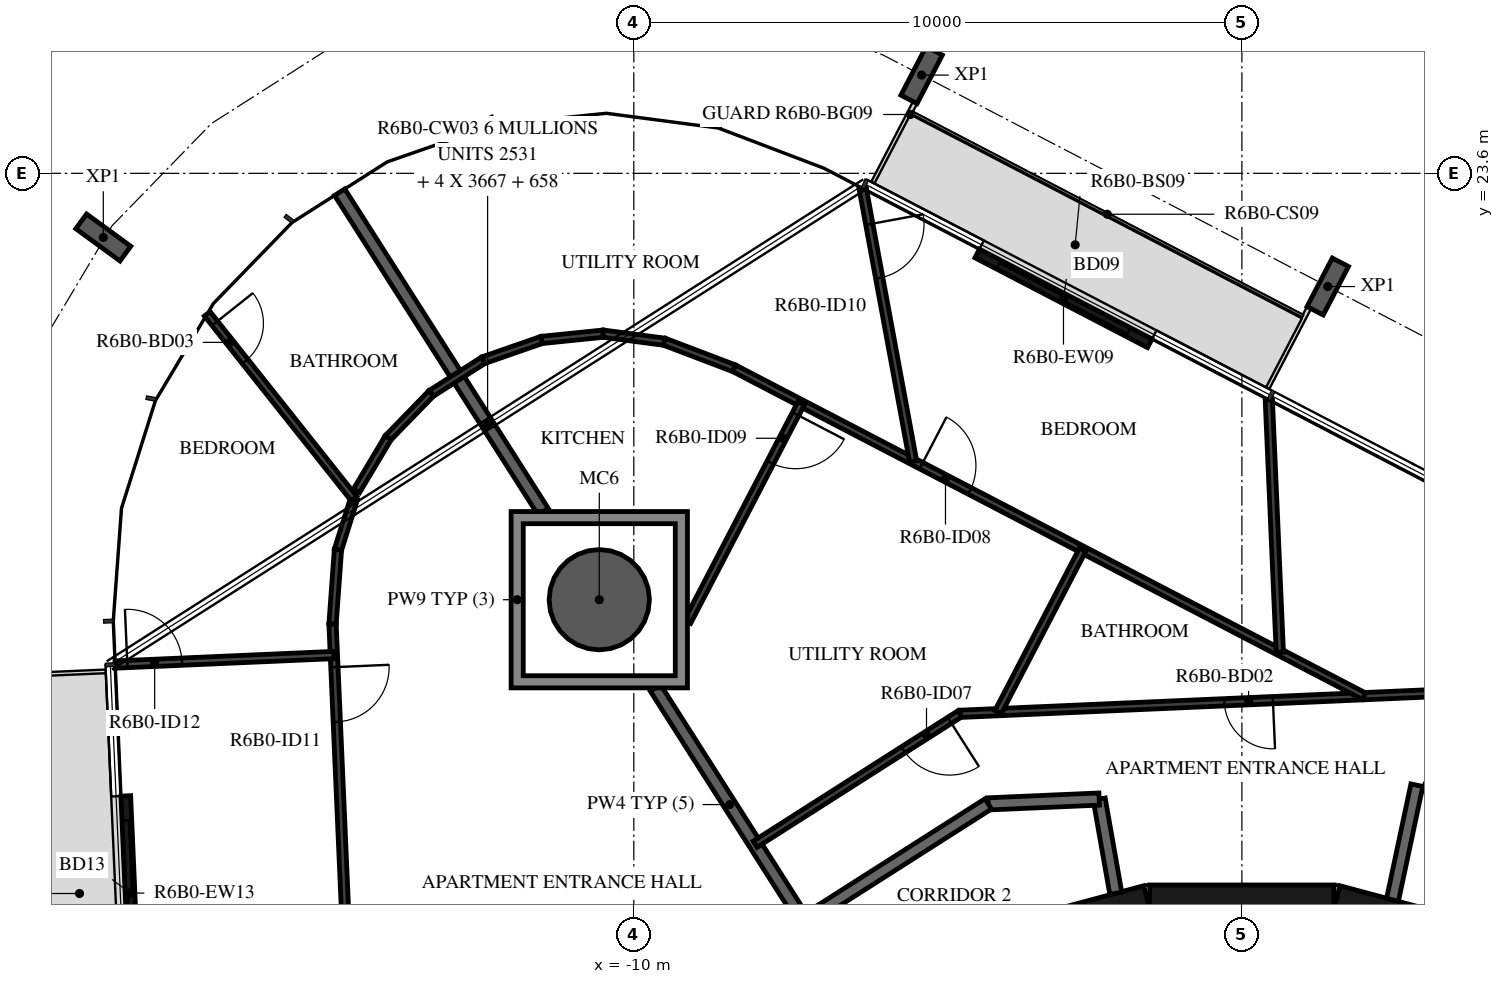
"""IFC4 building model, lengths in metres.
Left out: names, types, materials, properties, quantities, classifications, styles, units other than length and angle.
Written with IfcOpenShell. Run it as: python <this file> out.ifc"""

import sys

from ifc_helpers import new_model, si_unit, direction, frame, frame_2d, origin, origin_2d, place, context, subcontext, project, spatial, polyline, rectangle, hollow_circle, i_section, outline, extrude, element, fill, save


model = new_model("IFC4")
c1 = context("Model", 3, precision=1e-05, world=origin(), true_north=direction((0.0, 1.0)))
c2 = subcontext(c1, "Body", "Model", "MODEL_VIEW")
j1 = project(units=[si_unit("LENGTHUNIT", "METRE"), si_unit("PLANEANGLEUNIT", "RADIAN")], contexts=[c1])
p1 = place(None, origin())
s1 = spatial("IfcSite", under=j1, at=p1, CompositionType="ELEMENT")
p2 = place(p1, origin())
s2 = spatial("IfcBuilding", under=s1, at=p2, CompositionType="ELEMENT")
p3 = place(p2, frame((0.0, 0.0, 240.7)))
s3 = spatial("IfcBuildingStorey", under=s2, at=p3, CompositionType="ELEMENT", Elevation=240.7)
p4 = place(p3, frame((-10.568, 16.588, -0.38), z_axis=(0.0, 0.0, 1.0), x_axis=(1.0, 0.0, 0.0)))
e1 = element("IfcColumn", 1, at=p4, inside=s3, PredefinedType="COLUMN", context=c2, shape_type="SweptSolid", body=[
    extrude(hollow_circle(Radius=0.825, WallThickness=0.04, at=origin_2d()), origin(), (0.0, 0.0, 1.0), 3.5),
])
for number, where, z_axis, x_axis in (
    (2, (1.412, 21.739, -0.38), (0.0, 0.0, 1.0), (0.887, -0.462, 0.0)),
    (3, (-5.267, 25.216, -0.38), (0.0, 0.0, 1.0), (0.887, -0.462, 0.0)),
    (4, (-18.724, 22.545, -0.38), (0.0, 0.0, 1.0), (0.59, 0.808, 0.0)),
):
    element("IfcColumn", number, at=place(p3, frame(where, z_axis=z_axis, x_axis=x_axis)), inside=s3, PredefinedType="COLUMN", context=c2, shape_type="SweptSolid", body=[
        extrude(i_section(OverallWidth=0.3, OverallDepth=0.9, WebThickness=0.019, FlangeThickness=0.035, FilletRadius=0.03, at=origin_2d()), origin(), (0.0, 0.0, 1.0), 3.5),
    ])
p5 = place(p3, frame((-1.515, 20.804, 0.0), z_axis=(0.0, 0.0, 1.0), x_axis=(-0.887014349583, 0.461741858221, 0.0)))
e5 = element("IfcWall", 5, at=p5, inside=s3, PredefinedType="STANDARD", context=c2, shape_type="SweptSolid", body=[
    extrude(rectangle(XDim=3.2, YDim=0.16, at=frame_2d((1.6, 0.0))), origin(), (0.0, 0.0, 1.0), 3.12),
])
p6 = place(p5, frame((0.4, 0.0, 0.0)))
e6 = element("IfcOpeningElement", 6, at=p6, cuts=e5, PredefinedType="OPENING", context=c2, shape_type="SweptSolid", body=[
    extrude(rectangle(XDim=2.4, YDim=2.4, at=frame_2d((1.2, 1.2))), frame((0.0, 0.09, 0.0), z_axis=(0.0, -1.0, 0.0), x_axis=(1.0, 0.0, 0.0)), (0.0, 0.0, 1.0), 0.18),
])
p7 = place(p3, frame((-18.355, 13.362, 0.0), z_axis=(0.0, 0.0, 1.0), x_axis=(0.043639181999, -0.999047357133, 0.0)))
e7 = element("IfcWall", 7, at=p7, inside=s3, PredefinedType="STANDARD", context=c2, shape_type="SweptSolid", body=[
    extrude(rectangle(XDim=3.2, YDim=0.16, at=frame_2d((1.6, 0.0))), origin(), (0.0, 0.0, 1.0), 3.12),
])
p8 = place(p7, frame((0.4, 0.0, 0.0)))
e8 = element("IfcOpeningElement", 8, at=p8, cuts=e7, PredefinedType="OPENING", context=c2, shape_type="SweptSolid", body=[
    extrude(rectangle(XDim=2.4, YDim=2.4, at=frame_2d((1.2, 1.2))), frame((0.0, 0.09, 0.0), z_axis=(0.0, -1.0, 0.0), x_axis=(1.0, 0.0, 0.0)), (0.0, 0.0, 1.0), 0.18),
])
for number, where, z_axis, x_axis in (
    (9, (4.479, 10.858, 0.0), (0.0, 0.0, 1.0), (-0.966, 0.259, 0.0)),
    (10, (1.516, 11.647, 0.0), (0.0, 0.0, 1.0), (-1.0, 0.0, 0.0)),
    (11, (-1.55, 11.643, 0.0), (0.0, 0.0, 1.0), (-0.966, -0.259, 0.0)),
):
    element("IfcWall", number, at=place(p3, frame(where, z_axis=z_axis, x_axis=x_axis)), inside=s3, PredefinedType="SHEAR", context=c2, shape_type="SweptSolid", body=[
        extrude(rectangle(XDim=3.033, YDim=0.5, at=frame_2d((1.516, 0.0))), origin(), (0.0, 0.0, 1.0), 3.12),
    ])
p9 = place(p3, frame((9.372, 10.228, 0.0), z_axis=(0.0, 0.0, 1.0), x_axis=(-0.887005184532, 0.461759464021, 0.0)))
e12 = element("IfcWall", 12, at=p9, inside=s3, PredefinedType="STANDARD", context=c2, shape_type="SweptSolid", body=[
    extrude(rectangle(XDim=7.181, YDim=0.2, at=frame_2d((3.591, 0.0))), origin(), (0.0, 0.0, 1.0), 3.12),
])
p10 = place(p3, frame((2.878, 13.538, 0.0), z_axis=(0.0, 0.0, 1.0), x_axis=(-0.207893604596, -0.978151444904, 0.0)))
e13 = element("IfcWall", 13, at=p10, inside=s3, PredefinedType="STANDARD", context=c2, shape_type="SweptSolid", body=[
    extrude(rectangle(XDim=1.927, YDim=0.2, at=frame_2d((0.963, 0.0))), origin(), (0.0, 0.0, 1.0), 3.12),
])
p11 = place(p3, frame((-2.074, 11.761, 0.0), z_axis=(0.0, 0.0, 1.0), x_axis=(-0.173679082312, 0.984802303189, 0.0)))
e14 = element("IfcWall", 14, at=p11, inside=s3, PredefinedType="STANDARD", context=c2, shape_type="SweptSolid", body=[
    extrude(rectangle(XDim=1.573, YDim=0.2, at=frame_2d((0.787, 0.0))), origin(), (0.0, 0.0, 1.0), 3.12),
])
p12 = place(p3, frame((-2.347, 13.31, 0.0), z_axis=(0.0, 0.0, 1.0), x_axis=(-0.999050095671, -0.043576442492, 0.0)))
e15 = element("IfcWall", 15, at=p12, inside=s3, PredefinedType="STANDARD", context=c2, shape_type="SweptSolid", body=[
    extrude(rectangle(XDim=1.826, YDim=0.2, at=frame_2d((0.913, 0.0))), origin(), (0.0, 0.0, 1.0), 3.12),
])
p13 = place(p3, frame((-4.172, 13.231, 0.0), z_axis=(0.0, 0.0, 1.0), x_axis=(-0.843388394728, -0.537304397561, 0.0)))
e16 = element("IfcWall", 16, at=p13, inside=s3, PredefinedType="STANDARD", context=c2, shape_type="SweptSolid", body=[
    extrude(rectangle(XDim=7.181, YDim=0.2, at=frame_2d((3.59, 0.0))), origin(), (0.0, 0.0, 1.0), 3.12),
])
p14 = place(p3, frame((-9.645, 15.138, 0.0), z_axis=(0.0, 0.0, 1.0), x_axis=(0.537267800866, -0.84341170857, 0.0)))
e17 = element("IfcWall", 17, at=p14, inside=s3, PredefinedType="STANDARD", context=c2, shape_type="SweptSolid", body=[
    extrude(rectangle(XDim=4.55, YDim=0.2, at=frame_2d((2.275, 0.0))), origin(), (0.0, 0.0, 1.0), 3.12),
])
p15 = place(p3, frame((-14.837, 23.29, 0.0), z_axis=(0.0, 0.0, 1.0), x_axis=(0.537316863221, -0.843380452998, 0.0)))
e18 = element("IfcWall", 18, at=p15, inside=s3, PredefinedType="STANDARD", context=c2, shape_type="SweptSolid", body=[
    extrude(rectangle(XDim=6.227, YDim=0.2, at=frame_2d((3.113, 0.0))), origin(), (0.0, 0.0, 1.0), 3.12),
])
p16 = place(p3, frame((3.339, 15.06, 0.0), z_axis=(0.0, 0.0, 1.0), x_axis=(-0.999047716945, -0.043630943905, 0.0)))
e19 = element("IfcWall", 19, at=p16, inside=s3, PredefinedType="PARTITIONING", context=c2, shape_type="SweptSolid", body=[
    extrude(rectangle(XDim=7.985, YDim=0.12, at=frame_2d((3.992, 0.0))), origin(), (0.0, 0.0, 1.0), 3.12),
])
p17 = place(p16, frame((2.831, 0.0, 0.0)))
e20 = element("IfcOpeningElement", 20, at=p17, cuts=e19, PredefinedType="OPENING", context=c2, shape_type="SweptSolid", body=[
    extrude(rectangle(XDim=0.8, YDim=2.1, at=frame_2d((0.4, 1.05))), frame((0.0, 0.07, 0.0), z_axis=(0.0, -1.0, 0.0), x_axis=(1.0, 0.0, 0.0)), (0.0, 0.0, 1.0), 0.14),
])
p18 = place(p3, frame((-4.639, 14.712, 0.0), z_axis=(0.0, 0.0, 1.0), x_axis=(-0.843376843237, -0.537322529113, 0.0)))
e21 = element("IfcWall", 21, at=p18, inside=s3, PredefinedType="PARTITIONING", context=c2, shape_type="SweptSolid", body=[
    extrude(rectangle(XDim=3.992, YDim=0.12, at=frame_2d((1.996, 0.0))), origin(), (0.0, 0.0, 1.0), 3.12),
])
p19 = place(p18, frame((0.2, 0.0, 0.0)))
e22 = element("IfcOpeningElement", 22, at=p19, cuts=e21, PredefinedType="OPENING", context=c2, shape_type="SweptSolid", body=[
    extrude(rectangle(XDim=0.9, YDim=2.1, at=frame_2d((0.45, 1.05))), frame((0.0, 0.07, 0.0), z_axis=(0.0, -1.0, 0.0), x_axis=(1.0, 0.0, 0.0)), (0.0, 0.0, 1.0), 0.14),
])
p20 = place(p3, frame((-8.35, 20.394, 0.0), z_axis=(0.0, 0.0, 1.0), x_axis=(0.887020940825, -0.461729196107, 0.0)))
e23 = element("IfcWall", 23, at=p20, inside=s3, PredefinedType="PARTITIONING", context=c2, shape_type="SweptSolid", body=[
    extrude(rectangle(XDim=11.678, YDim=0.12, at=frame_2d((5.839, 0.0))), origin(), (0.0, 0.0, 1.0), 3.12),
])
p21 = place(p20, frame((3.469, 0.0, 0.0)))
e24 = element("IfcOpeningElement", 24, at=p21, cuts=e23, PredefinedType="OPENING", context=c2, shape_type="SweptSolid", body=[
    extrude(rectangle(XDim=0.9, YDim=2.1, at=frame_2d((0.45, 1.05))), frame((0.0, 0.07, 0.0), z_axis=(0.0, -1.0, 0.0), x_axis=(1.0, 0.0, 0.0)), (0.0, 0.0, 1.0), 0.14),
])
p22 = place(p3, frame((0.442, 19.876, 0.0), z_axis=(0.0, 0.0, 1.0), x_axis=(0.043638577658, -0.999047383531, 0.0)))
e25 = element("IfcWall", 25, at=p22, inside=s3, PredefinedType="PARTITIONING", context=c2, shape_type="SweptSolid", body=[
    extrude(rectangle(XDim=4.157, YDim=0.12, at=frame_2d((2.078, 0.0))), origin(), (0.0, 0.0, 1.0), 3.12),
])
p23 = place(p3, frame((-2.619, 17.411, 0.0), z_axis=(0.0, 0.0, 1.0), x_axis=(-0.461743141736, -0.887013681439, 0.0)))
e26 = element("IfcWall", 26, at=p23, inside=s3, PredefinedType="PARTITIONING", context=c2, shape_type="SweptSolid", body=[
    extrude(rectangle(XDim=3.012, YDim=0.12, at=frame_2d((1.506, 0.0))), origin(), (0.0, 0.0, 1.0), 3.12),
])
p24 = place(p3, frame((-6.237, 23.353, 0.0), z_axis=(0.0, 0.0, 1.0), x_axis=(0.181909323114, -0.983315309636, 0.0)))
e27 = element("IfcWall", 27, at=p24, inside=s3, PredefinedType="PARTITIONING", context=c2, shape_type="SweptSolid", body=[
    extrude(rectangle(XDim=4.567, YDim=0.12, at=frame_2d((2.284, 0.0))), origin(), (0.0, 0.0, 1.0), 3.12),
])
p25 = place(p24, frame((0.6, 0.0, 0.0)))
e28 = element("IfcOpeningElement", 28, at=p25, cuts=e27, PredefinedType="OPENING", context=c2, shape_type="SweptSolid", body=[
    extrude(rectangle(XDim=0.9, YDim=2.1, at=frame_2d((0.45, 1.05))), frame((0.0, 0.07, 0.0), z_axis=(0.0, -1.0, 0.0), x_axis=(1.0, 0.0, 0.0)), (0.0, 0.0, 1.0), 0.14),
])
p26 = place(p3, frame((-7.247, 19.82, 0.0), z_axis=(0.0, 0.0, 1.0), x_axis=(-0.461733980956, -0.887018450107, 0.0)))
e29 = element("IfcWall", 29, at=p26, inside=s3, PredefinedType="PARTITIONING", context=c2, shape_type="SweptSolid", body=[
    extrude(rectangle(XDim=4.052, YDim=0.12, at=frame_2d((2.026, 0.0))), origin(), (0.0, 0.0, 1.0), 3.12),
])
p27 = place(p26, frame((0.2, 0.0, 0.0)))
e30 = element("IfcOpeningElement", 30, at=p27, cuts=e29, PredefinedType="OPENING", context=c2, shape_type="SweptSolid", body=[
    extrude(rectangle(XDim=0.9, YDim=2.1, at=frame_2d((0.45, 1.05))), frame((0.0, 0.07, 0.0), z_axis=(0.0, -1.0, 0.0), x_axis=(1.0, 0.0, 0.0)), (0.0, 0.0, 1.0), 0.14),
])
for number, where, z_axis, x_axis in (
    (31, (-13.332, 19.981, 0.0), (0.0, 0.0, 1.0), (0.843, 0.537, 0.0)),
    (32, (-12.475, 20.527, 0.0), (0.0, 0.0, 1.0), (0.945, 0.328, 0.0)),
):
    element("IfcWall", number, at=place(p3, frame(where, z_axis=z_axis, x_axis=x_axis)), inside=s3, PredefinedType="PARTITIONING", context=c2, shape_type="SweptSolid", body=[
        extrude(rectangle(XDim=1.016, YDim=0.12, at=frame_2d((0.508, 0.0))), origin(), (0.0, 0.0, 1.0), 3.12),
    ])
p28 = place(p3, frame((-11.515, 20.86, 0.0), z_axis=(0.0, 0.0, 1.0), x_axis=(0.994818278641, 0.101669034034, 0.0)))
e33 = element("IfcWall", 33, at=p28, inside=s3, PredefinedType="PARTITIONING", context=c2, shape_type="SweptSolid", body=[
    extrude(rectangle(XDim=1.016, YDim=0.12, at=frame_2d((0.508, 0.0))), origin(), (0.0, 0.0, 1.0), 3.12),
])
p29 = place(p3, frame((-10.504, 20.963, 0.0), z_axis=(0.0, 0.0, 1.0), x_axis=(0.991451023706, -0.13047937612, 0.0)))
e34 = element("IfcWall", 34, at=p29, inside=s3, PredefinedType="PARTITIONING", context=c2, shape_type="SweptSolid", body=[
    extrude(rectangle(XDim=1.016, YDim=0.12, at=frame_2d((0.508, 0.0))), origin(), (0.0, 0.0, 1.0), 3.12),
])
p30 = place(p3, frame((-9.497, 20.831, 0.0), z_axis=(0.0, 0.0, 1.0), x_axis=(0.934575963521, -0.355763641213, 0.0)))
e35 = element("IfcWall", 35, at=p30, inside=s3, PredefinedType="PARTITIONING", context=c2, shape_type="SweptSolid", body=[
    extrude(rectangle(XDim=1.227, YDim=0.12, at=frame_2d((0.614, 0.0))), origin(), (0.0, 0.0, 1.0), 3.12),
])
for number, where, z_axis, x_axis in (
    (36, (-13.332, 19.981, 0.0), (0.0, 0.0, 1.0), (-0.697, -0.717, 0.0)),
    (37, (-14.039, 19.252, 0.0), (0.0, 0.0, 1.0), (-0.513, -0.859, 0.0)),
):
    element("IfcWall", number, at=place(p3, frame(where, z_axis=z_axis, x_axis=x_axis)), inside=s3, PredefinedType="PARTITIONING", context=c2, shape_type="SweptSolid", body=[
        extrude(rectangle(XDim=1.016, YDim=0.12, at=frame_2d((0.508, 0.0))), origin(), (0.0, 0.0, 1.0), 3.12),
    ])
p31 = place(p3, frame((-14.601, 18.25, 0.0), z_axis=(0.0, 0.0, 1.0), x_axis=(-0.300706496876, -0.953716730867, 0.0)))
e38 = element("IfcWall", 38, at=p31, inside=s3, PredefinedType="PARTITIONING", context=c2, shape_type="SweptSolid", body=[
    extrude(rectangle(XDim=0.88, YDim=0.12, at=frame_2d((0.44, 0.0))), origin(), (0.0, 0.0, 1.0), 3.12),
])
p32 = place(p3, frame((-14.865, 17.411, 0.0), z_axis=(0.0, 0.0, 1.0), x_axis=(-0.072618457011, -0.997359794508, 0.0)))
e39 = element("IfcWall", 39, at=p32, inside=s3, PredefinedType="PARTITIONING", context=c2, shape_type="SweptSolid", body=[
    extrude(rectangle(XDim=1.227, YDim=0.12, at=frame_2d((0.614, 0.0))), origin(), (0.0, 0.0, 1.0), 3.12),
])
p33 = place(p3, frame((-14.955, 16.187, 0.0), z_axis=(0.0, 0.0, 1.0), x_axis=(0.04360777668, -0.999048728448, 0.0)))
e40 = element("IfcWall", 40, at=p33, inside=s3, PredefinedType="PARTITIONING", context=c2, shape_type="SweptSolid", body=[
    extrude(rectangle(XDim=11.679, YDim=0.12, at=frame_2d((5.839, 0.0))), origin(), (0.0, 0.0, 1.0), 3.12),
])
p34 = place(p33, frame((0.709, 0.0, 0.0)))
e41 = element("IfcOpeningElement", 41, at=p34, cuts=e40, PredefinedType="OPENING", context=c2, shape_type="SweptSolid", body=[
    extrude(rectangle(XDim=0.9, YDim=2.1, at=frame_2d((0.45, 1.05))), frame((0.0, 0.07, 0.0), z_axis=(0.0, -1.0, 0.0), x_axis=(1.0, 0.0, 0.0)), (0.0, 0.0, 1.0), 0.14),
])
p35 = place(p3, frame((-17.015, 21.29, 0.0), z_axis=(0.0, 0.0, 1.0), x_axis=(0.621976289729, -0.783036075168, 0.0)))
e42 = element("IfcWall", 42, at=p35, inside=s3, PredefinedType="PARTITIONING", context=c2, shape_type="SweptSolid", body=[
    extrude(rectangle(XDim=3.882, YDim=0.12, at=frame_2d((1.941, 0.0))), origin(), (0.0, 0.0, 1.0), 3.12),
])
p36 = place(p35, frame((0.2, 0.0, 0.0)))
e43 = element("IfcOpeningElement", 43, at=p36, cuts=e42, PredefinedType="OPENING", context=c2, shape_type="SweptSolid", body=[
    extrude(rectangle(XDim=0.8, YDim=2.1, at=frame_2d((0.4, 1.05))), frame((0.0, 0.07, 0.0), z_axis=(0.0, -1.0, 0.0), x_axis=(1.0, 0.0, 0.0)), (0.0, 0.0, 1.0), 0.14),
])
p37 = place(p3, frame((-18.529, 15.522, 0.0), z_axis=(0.0, 0.0, 1.0), x_axis=(0.999048722018, 0.043607923987, 0.0)))
e44 = element("IfcWall", 44, at=p37, inside=s3, PredefinedType="PARTITIONING", context=c2, shape_type="SweptSolid", body=[
    extrude(rectangle(XDim=3.6, YDim=0.12, at=frame_2d((1.8, 0.0))), origin(), (0.0, 0.0, 1.0), 2.73),
])
p38 = place(p37, frame((0.2, 0.0, 0.0)))
e45 = element("IfcOpeningElement", 45, at=p38, cuts=e44, PredefinedType="OPENING", context=c2, shape_type="SweptSolid", body=[
    extrude(rectangle(XDim=0.9, YDim=2.1, at=frame_2d((0.45, 1.05))), frame((0.0, 0.07, 0.0), z_axis=(0.0, -1.0, 0.0), x_axis=(1.0, 0.0, 0.0)), (0.0, 0.0, 1.0), 0.14),
])
p39 = place(p3, origin())
e46 = element("IfcWall", 46, at=p39, inside=s3, PredefinedType="STANDARD", context=c2, shape_type="SweptSolid", body=[
    extrude(outline(polyline([(-9.118, 18.038), (-9.118, 15.138), (-12.018, 15.138), (-12.018, 18.038), (-9.118, 18.038)]), holes=[polyline([(-11.818, 15.338), (-9.318, 15.338), (-9.318, 17.838), (-11.818, 17.838), (-11.818, 15.338)])]), origin(), (0.0, 0.0, 1.0), 3.12),
])
p40 = place(p6, origin())
e47 = element("IfcDoor", 47, at=p40, inside=s3, OperationType="DOUBLE_DOOR_SLIDING", PredefinedType="DOOR", context=c2, shape_type="SweptSolid", body=[
    extrude(rectangle(XDim=2.4, YDim=2.4, at=frame_2d((1.2, 1.2))), frame((0.0, 0.025, 0.0), z_axis=(0.0, -1.0, 0.0), x_axis=(1.0, 0.0, 0.0)), (0.0, 0.0, 1.0), 0.05),
])
fill(e6, e47)
p41 = place(p8, origin())
e48 = element("IfcDoor", 48, at=p41, inside=s3, OperationType="DOUBLE_DOOR_SLIDING", PredefinedType="DOOR", context=c2, shape_type="SweptSolid", body=[
    extrude(rectangle(XDim=2.4, YDim=2.4, at=frame_2d((1.2, 1.2))), frame((0.0, 0.025, 0.0), z_axis=(0.0, -1.0, 0.0), x_axis=(1.0, 0.0, 0.0)), (0.0, 0.0, 1.0), 0.05),
])
fill(e8, e48)
p42 = place(p17, origin())
e49 = element("IfcDoor", 49, at=p42, inside=s3, OperationType="SINGLE_SWING_RIGHT", PredefinedType="DOOR", context=c2, shape_type="SweptSolid", body=[
    extrude(rectangle(XDim=0.8, YDim=2.1, at=frame_2d((0.4, 1.05))), frame((0.0, 0.025, 0.0), z_axis=(0.0, -1.0, 0.0), x_axis=(1.0, 0.0, 0.0)), (0.0, 0.0, 1.0), 0.05),
])
fill(e20, e49)
p43 = place(p19, origin())
e50 = element("IfcDoor", 50, at=p43, inside=s3, OperationType="SINGLE_SWING_RIGHT", PredefinedType="DOOR", context=c2, shape_type="SweptSolid", body=[
    extrude(rectangle(XDim=0.9, YDim=2.1, at=frame_2d((0.45, 1.05))), frame((0.0, 0.025, 0.0), z_axis=(0.0, -1.0, 0.0), x_axis=(1.0, 0.0, 0.0)), (0.0, 0.0, 1.0), 0.05),
])
fill(e22, e50)
p44 = place(p21, origin())
e51 = element("IfcDoor", 51, at=p44, inside=s3, OperationType="SINGLE_SWING_RIGHT", PredefinedType="DOOR", context=c2, shape_type="SweptSolid", body=[
    extrude(rectangle(XDim=0.9, YDim=2.1, at=frame_2d((0.45, 1.05))), frame((0.0, 0.025, 0.0), z_axis=(0.0, -1.0, 0.0), x_axis=(1.0, 0.0, 0.0)), (0.0, 0.0, 1.0), 0.05),
])
fill(e24, e51)
p45 = place(p27, origin())
e52 = element("IfcDoor", 52, at=p45, inside=s3, OperationType="SINGLE_SWING_RIGHT", PredefinedType="DOOR", context=c2, shape_type="SweptSolid", body=[
    extrude(rectangle(XDim=0.9, YDim=2.1, at=frame_2d((0.45, 1.05))), frame((0.0, 0.025, 0.0), z_axis=(0.0, -1.0, 0.0), x_axis=(1.0, 0.0, 0.0)), (0.0, 0.0, 1.0), 0.05),
])
fill(e30, e52)
p46 = place(p25, origin())
e53 = element("IfcDoor", 53, at=p46, inside=s3, OperationType="SINGLE_SWING_RIGHT", PredefinedType="DOOR", context=c2, shape_type="SweptSolid", body=[
    extrude(rectangle(XDim=0.9, YDim=2.1, at=frame_2d((0.45, 1.05))), frame((0.0, 0.025, 0.0), z_axis=(0.0, -1.0, 0.0), x_axis=(1.0, 0.0, 0.0)), (0.0, 0.0, 1.0), 0.05),
])
fill(e28, e53)
p47 = place(p34, origin())
e54 = element("IfcDoor", 54, at=p47, inside=s3, OperationType="SINGLE_SWING_LEFT", PredefinedType="DOOR", context=c2, shape_type="SweptSolid", body=[
    extrude(rectangle(XDim=0.9, YDim=2.1, at=frame_2d((0.45, 1.05))), frame((0.0, 0.025, 0.0), z_axis=(0.0, -1.0, 0.0), x_axis=(1.0, 0.0, 0.0)), (0.0, 0.0, 1.0), 0.05),
])
fill(e41, e54)
p48 = place(p38, origin())
e55 = element("IfcDoor", 55, at=p48, inside=s3, OperationType="SINGLE_SWING_LEFT", PredefinedType="DOOR", context=c2, shape_type="SweptSolid", body=[
    extrude(rectangle(XDim=0.9, YDim=2.1, at=frame_2d((0.45, 1.05))), frame((0.0, 0.025, 0.0), z_axis=(0.0, -1.0, 0.0), x_axis=(1.0, 0.0, 0.0)), (0.0, 0.0, 1.0), 0.05),
])
fill(e45, e55)
p49 = place(p36, origin())
e56 = element("IfcDoor", 56, at=p49, inside=s3, OperationType="SINGLE_SWING_LEFT", PredefinedType="DOOR", context=c2, shape_type="SweptSolid", body=[
    extrude(rectangle(XDim=0.8, YDim=2.1, at=frame_2d((0.4, 1.05))), frame((0.0, 0.025, 0.0), z_axis=(0.0, -1.0, 0.0), x_axis=(1.0, 0.0, 0.0)), (0.0, 0.0, 1.0), 0.05),
])
fill(e43, e56)
save(model, sys.argv[1])
